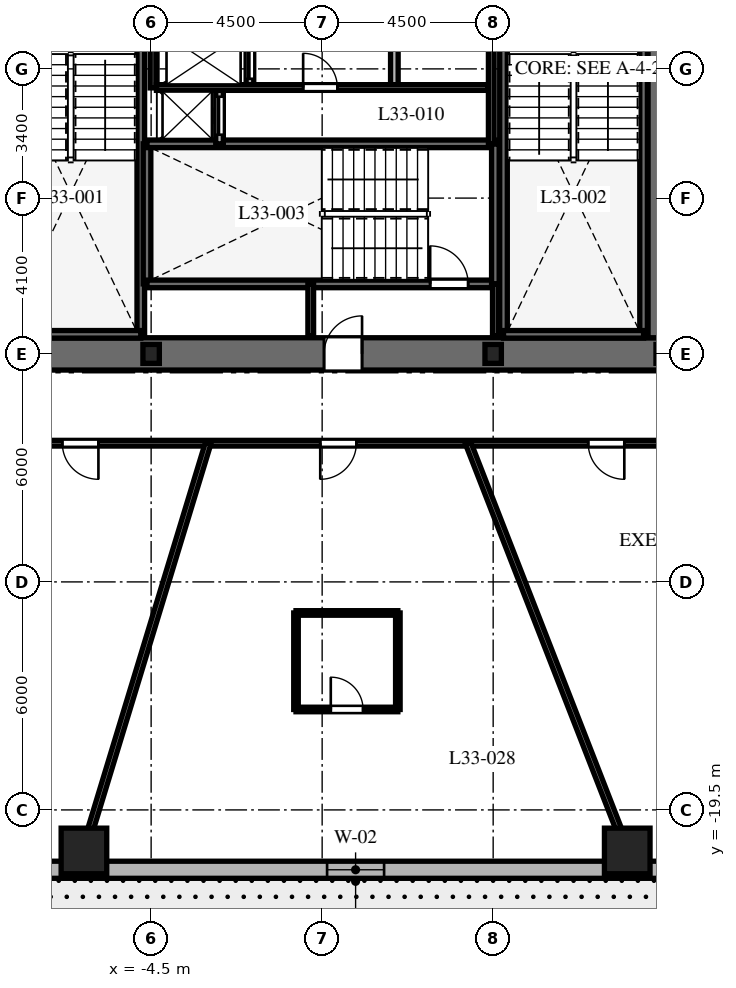
"""IFC4 building model, lengths in metres.
Left out: names, types, materials, properties, quantities, classifications, styles, units other than length and angle.
Written with IfcOpenShell. Run it as: python <this file> out.ifc"""

import sys

from ifc_helpers import new_model, si_unit, direction, frame, frame_2d, origin, origin_2d, place, context, subcontext, project, spatial, rectangle, i_section, extrude, element, fill, save


model = new_model("IFC4")
c1 = context("Model", 3, precision=1e-05, world=origin(), true_north=direction((0.0, 1.0)))
c2 = subcontext(c1, "Body", "Model", "MODEL_VIEW")
j1 = project(units=[si_unit("LENGTHUNIT", "METRE"), si_unit("PLANEANGLEUNIT", "RADIAN")], contexts=[c1])
p1 = place(None, origin())
s1 = spatial("IfcSite", under=j1, at=p1, CompositionType="ELEMENT")
p2 = place(p1, origin())
s2 = spatial("IfcBuilding", under=s1, at=p2, CompositionType="ELEMENT")
p3 = place(p2, frame((0.0, 0.0, 135.8)))
s3 = spatial("IfcBuildingStorey", under=s2, at=p3, CompositionType="ELEMENT", Elevation=135.8)
p4 = place(p3, frame((-9.425, -7.5, 0.0), z_axis=(0.0, 0.0, 1.0), x_axis=(1.0, 0.0, 0.0)))
e1 = element("IfcWall", 1, at=p4, inside=s3, PredefinedType="SHEAR", context=c2, shape_type="SweptSolid", body=[
    extrude(rectangle(XDim=18.85, YDim=0.85, at=frame_2d((9.425, 0.0))), origin(), (0.0, 0.0, 1.0), 3.7),
])
p5 = place(p4, frame((9.475, 0.0, 0.0)))
e2 = element("IfcOpeningElement", 2, at=p5, cuts=e1, PredefinedType="OPENING", context=c2, shape_type="SweptSolid", body=[
    extrude(rectangle(XDim=1.0, YDim=2.15, at=frame_2d((0.5, 1.075))), frame((0.0, 0.435, 0.0), z_axis=(0.0, -1.0, 0.0), x_axis=(1.0, 0.0, 0.0)), (0.0, 0.0, 1.0), 0.87),
])
p6 = place(p3, frame((9.0, -7.075, 0.0), z_axis=(0.0, 0.0, 1.0), x_axis=(0.0, 1.0, 0.0)))
e3 = element("IfcWall", 3, at=p6, inside=s3, PredefinedType="SHEAR", context=c2, shape_type="SweptSolid", body=[
    extrude(rectangle(XDim=14.15, YDim=0.85, at=frame_2d((7.075, 0.0))), origin(), (0.0, 0.0, 1.0), 3.7),
])
p7 = place(p6, frame((10.2, 0.0, 0.0)))
e4 = element("IfcOpeningElement", 4, at=p7, cuts=e3, PredefinedType="OPENING", context=c2, shape_type="SweptSolid", body=[
    extrude(rectangle(XDim=1.05, YDim=2.15, at=frame_2d((0.525, 1.075))), frame((0.0, 0.435, 0.0), z_axis=(0.0, -1.0, 0.0), x_axis=(1.0, 0.0, 0.0)), (0.0, 0.0, 1.0), 0.87),
])
p8 = place(p3, frame((-4.772, -6.985, 0.0), z_axis=(0.0, 0.0, 1.0), x_axis=(0.0, 1.0, 0.0)))
e5 = element("IfcWall", 5, at=p8, inside=s3, PredefinedType="SHEAR", context=c2, shape_type="SweptSolid", body=[
    extrude(rectangle(XDim=9.143, YDim=0.2, at=frame_2d((4.572, 0.0))), origin(), (0.0, 0.0, 1.0), 3.7),
])
p9 = place(p3, frame((-8.458, -6.985, 0.0), z_axis=(0.0, 0.0, 1.0), x_axis=(1.0, 0.0, 0.0)))
e6 = element("IfcWall", 6, at=p9, inside=s3, PredefinedType="SHEAR", context=c2, shape_type="SweptSolid", body=[
    extrude(rectangle(XDim=3.686, YDim=0.2, at=frame_2d((1.843, 0.0))), origin(), (0.0, 0.0, 1.0), 3.7),
])
for number, where, z_axis, x_axis in (
    (7, (4.772, -6.985, 0.0), (0.0, 0.0, 1.0), (0.0, 1.0, 0.0)),
    (8, (8.458, -6.985, 0.0), (0.0, 0.0, 1.0), (0.0, 1.0, 0.0)),
):
    element("IfcWall", number, at=place(p3, frame(where, z_axis=z_axis, x_axis=x_axis)), inside=s3, PredefinedType="SHEAR", context=c2, shape_type="SweptSolid", body=[
        extrude(rectangle(XDim=9.143, YDim=0.2, at=frame_2d((4.572, 0.0))), origin(), (0.0, 0.0, 1.0), 3.7),
    ])
for number, where, z_axis, x_axis in (
    (9, (4.772, -6.985, 0.0), (0.0, 0.0, 1.0), (1.0, 0.0, 0.0)),
    (10, (-4.608, -5.658, 0.0), (0.0, 0.0, 1.0), (0.0, 1.0, 0.0)),
):
    element("IfcWall", number, at=place(p3, frame(where, z_axis=z_axis, x_axis=x_axis)), inside=s3, PredefinedType="SHEAR", context=c2, shape_type="SweptSolid", body=[
        extrude(rectangle(XDim=3.686, YDim=0.2, at=frame_2d((1.843, 0.0))), origin(), (0.0, 0.0, 1.0), 3.7),
    ])
p10 = place(p3, frame((-4.608, -5.658, 0.0), z_axis=(0.0, 0.0, 1.0), x_axis=(1.0, 0.0, 0.0)))
e11 = element("IfcWall", 11, at=p10, inside=s3, PredefinedType="SHEAR", context=c2, shape_type="SweptSolid", body=[
    extrude(rectangle(XDim=9.166, YDim=0.2, at=frame_2d((4.583, 0.0))), origin(), (0.0, 0.0, 1.0), 3.7),
])
p11 = place(p10, frame((7.45, 0.0, 0.0)))
e12 = element("IfcOpeningElement", 12, at=p11, cuts=e11, PredefinedType="OPENING", context=c2, shape_type="SweptSolid", body=[
    extrude(rectangle(XDim=1.0, YDim=2.15, at=frame_2d((0.5, 1.075))), frame((0.0, 0.11, 0.0), z_axis=(0.0, -1.0, 0.0), x_axis=(1.0, 0.0, 0.0)), (0.0, 0.0, 1.0), 0.22),
])
p12 = place(p3, frame((-4.608, -1.972, 0.0), z_axis=(0.0, 0.0, 1.0), x_axis=(1.0, 0.0, 0.0)))
e13 = element("IfcWall", 13, at=p12, inside=s3, PredefinedType="SHEAR", context=c2, shape_type="SweptSolid", body=[
    extrude(rectangle(XDim=9.166, YDim=0.2, at=frame_2d((4.583, 0.0))), origin(), (0.0, 0.0, 1.0), 3.7),
])
p13 = place(p3, frame((4.558, -5.658, 0.0), z_axis=(0.0, 0.0, 1.0), x_axis=(0.0, 1.0, 0.0)))
e14 = element("IfcWall", 14, at=p13, inside=s3, PredefinedType="SHEAR", context=c2, shape_type="SweptSolid", body=[
    extrude(rectangle(XDim=3.686, YDim=0.2, at=frame_2d((1.843, 0.0))), origin(), (0.0, 0.0, 1.0), 3.7),
])
for number, where, z_axis, x_axis in (
    (15, (-4.5, -7.5, 0.0), (0.0, 0.0, 1.0), (1.0, 0.0, 0.0)),
    (16, (4.5, -7.5, 0.0), (0.0, 0.0, 1.0), (1.0, 0.0, 0.0)),
    (17, (9.0, -7.5, 0.0), (0.0, 0.0, 1.0), (1.0, 0.0, 0.0)),
):
    element("IfcColumn", number, at=place(p3, frame(where, z_axis=z_axis, x_axis=x_axis)), inside=s3, PredefinedType="COLUMN", context=c2, shape_type="SweptSolid", body=[
        extrude(i_section(OverallWidth=0.432, OverallDepth=0.498, WebThickness=0.056, FlangeThickness=0.089, at=origin_2d()), origin(), (0.0, 0.0, 1.0), 3.7),
    ])
for number, where, z_axis, x_axis in (
    (18, (-6.268, -20.58, 0.0), (0.0, 0.0, 1.0), (1.0, 0.0, 0.0)),
    (19, (8.028, -20.58, 0.0), (0.0, 0.0, 1.0), (1.0, 0.0, 0.0)),
):
    element("IfcColumn", number, at=place(p3, frame(where, z_axis=z_axis, x_axis=x_axis)), inside=s3, PredefinedType="COLUMN", context=c2, shape_type="SweptSolid", body=[
        extrude(rectangle(XDim=1.2, YDim=1.2, at=origin_2d()), origin(), (0.0, 0.0, 1.0), 3.7),
    ])
p14 = place(p3, frame((-11.012, -21.075, 0.0), z_axis=(0.0, 0.0, 1.0), x_axis=(1.0, 0.0, 0.0)))
e20 = element("IfcWall", 20, at=p14, inside=s3, PredefinedType="SOLIDWALL", context=c2, shape_type="SweptSolid", body=[
    extrude(rectangle(XDim=23.782, YDim=0.45, at=frame_2d((11.891, 0.0))), origin(), (0.0, 0.0, 1.0), 3.38),
])
p15 = place(p14, frame((2.473, 0.0, 0.0)))
e21 = element("IfcOpeningElement", 21, at=p15, cuts=e20, PredefinedType="OPENING", context=c2, shape_type="SweptSolid", body=[
    extrude(rectangle(XDim=1.0, YDim=2.15, at=frame_2d((0.5, 1.075))), frame((0.0, 0.235, 0.0), z_axis=(0.0, -1.0, 0.0), x_axis=(1.0, 0.0, 0.0)), (0.0, 0.0, 1.0), 0.47),
])
p16 = place(p14, frame((11.142, 0.0, 0.8)))
e22 = element("IfcOpeningElement", 22, at=p16, cuts=e20, PredefinedType="OPENING", context=c2, shape_type="SweptSolid", body=[
    extrude(rectangle(XDim=1.5, YDim=1.8, at=frame_2d((0.75, 0.9))), frame((0.0, 0.235, 0.0), z_axis=(0.0, -1.0, 0.0), x_axis=(1.0, 0.0, 0.0)), (0.0, 0.0, 1.0), 0.47),
])
p17 = place(p14, frame((20.741, 0.0, 0.8)))
e23 = element("IfcOpeningElement", 23, at=p17, cuts=e20, PredefinedType="OPENING", context=c2, shape_type="SweptSolid", body=[
    extrude(rectangle(XDim=1.5, YDim=1.8, at=frame_2d((0.75, 0.9))), frame((0.0, 0.235, 0.0), z_axis=(0.0, -1.0, 0.0), x_axis=(1.0, 0.0, 0.0)), (0.0, 0.0, 1.0), 0.47),
])
for number, where, z_axis, x_axis in (
    (24, (-0.3, -7.02, 0.0), (0.0, 0.0, 1.0), (0.0, 1.0, 0.0)),
    (25, (4.558, -7.02, 0.0), (0.0, 0.0, 1.0), (0.0, 1.0, 0.0)),
):
    element("IfcWall", number, at=place(p3, frame(where, z_axis=z_axis, x_axis=x_axis)), inside=s3, PredefinedType="PARTITIONING", context=c2, shape_type="SweptSolid", body=[
        extrude(rectangle(XDim=1.362, YDim=0.15, at=frame_2d((0.681, 0.0))), origin(), (0.0, 0.0, 1.0), 3.38),
    ])
p18 = place(p3, frame((-2.7, -1.972, 0.0), z_axis=(0.0, 0.0, 1.0), x_axis=(0.0, 1.0, 0.0)))
e26 = element("IfcWall", 26, at=p18, inside=s3, PredefinedType="PARTITIONING", context=c2, shape_type="SweptSolid", body=[
    extrude(rectangle(XDim=1.472, YDim=0.2, at=frame_2d((0.736, 0.0))), origin(), (0.0, 0.0, 1.0), 3.38),
])
p19 = place(p18, frame((0.24, 0.0, 0.0)))
e27 = element("IfcOpeningElement", 27, at=p19, cuts=e26, PredefinedType="OPENING", context=c2, shape_type="SweptSolid", body=[
    extrude(rectangle(XDim=1.0, YDim=2.2, at=frame_2d((0.5, 1.1))), frame((0.0, 0.11, 0.0), z_axis=(0.0, -1.0, 0.0), x_axis=(1.0, 0.0, 0.0)), (0.0, 0.0, 1.0), 0.22),
])
p20 = place(p3, frame((-4.45, -0.5, 0.0), z_axis=(0.0, 0.0, 1.0), x_axis=(0.0, 1.0, 0.0)))
e28 = element("IfcWall", 28, at=p20, inside=s3, PredefinedType="PARTITIONING", context=c2, shape_type="SweptSolid", body=[
    extrude(rectangle(XDim=2.75, YDim=0.15, at=frame_2d((1.375, 0.0))), origin(), (0.0, 0.0, 1.0), 3.38),
])
p21 = place(p3, frame((4.45, -1.972, 0.0), z_axis=(0.0, 0.0, 1.0), x_axis=(0.0, 1.0, 0.0)))
e29 = element("IfcWall", 29, at=p21, inside=s3, PredefinedType="PARTITIONING", context=c2, shape_type="SweptSolid", body=[
    extrude(rectangle(XDim=4.222, YDim=0.15, at=frame_2d((2.111, 0.0))), origin(), (0.0, 0.0, 1.0), 3.38),
])
p22 = place(p3, frame((-1.9, -0.5, 0.0), z_axis=(0.0, 0.0, 1.0), x_axis=(0.0, 1.0, 0.0)))
e30 = element("IfcWall", 30, at=p22, inside=s3, PredefinedType="PARTITIONING", context=c2, shape_type="SweptSolid", body=[
    extrude(rectangle(XDim=4.44, YDim=0.2, at=frame_2d((2.22, 0.0))), origin(), (0.0, 0.0, 1.0), 3.38),
])
p23 = place(p22, frame((0.24, 0.0, 0.0)))
e31 = element("IfcOpeningElement", 31, at=p23, cuts=e30, PredefinedType="OPENING", context=c2, shape_type="SweptSolid", body=[
    extrude(rectangle(XDim=1.0, YDim=2.2, at=frame_2d((0.5, 1.1))), frame((0.0, 0.11, 0.0), z_axis=(0.0, -1.0, 0.0), x_axis=(1.0, 0.0, 0.0)), (0.0, 0.0, 1.0), 0.22),
])
p24 = place(p22, frame((1.72, 0.0, 0.0)))
e32 = element("IfcOpeningElement", 32, at=p24, cuts=e30, PredefinedType="OPENING", context=c2, shape_type="SweptSolid", body=[
    extrude(rectangle(XDim=1.0, YDim=2.2, at=frame_2d((0.5, 1.1))), frame((0.0, 0.11, 0.0), z_axis=(0.0, -1.0, 0.0), x_axis=(1.0, 0.0, 0.0)), (0.0, 0.0, 1.0), 0.22),
])
p25 = place(p22, frame((3.2, 0.0, 0.0)))
e33 = element("IfcOpeningElement", 33, at=p25, cuts=e30, PredefinedType="OPENING", context=c2, shape_type="SweptSolid", body=[
    extrude(rectangle(XDim=1.0, YDim=2.2, at=frame_2d((0.5, 1.1))), frame((0.0, 0.11, 0.0), z_axis=(0.0, -1.0, 0.0), x_axis=(1.0, 0.0, 0.0)), (0.0, 0.0, 1.0), 0.22),
])
p26 = place(p3, frame((1.9, -0.5, 0.0), z_axis=(0.0, 0.0, 1.0), x_axis=(0.0, 1.0, 0.0)))
e34 = element("IfcWall", 34, at=p26, inside=s3, PredefinedType="PARTITIONING", context=c2, shape_type="SweptSolid", body=[
    extrude(rectangle(XDim=4.44, YDim=0.2, at=frame_2d((2.22, 0.0))), origin(), (0.0, 0.0, 1.0), 3.38),
])
p27 = place(p3, frame((-4.36, -0.49, 0.0), z_axis=(0.0, 0.0, 1.0), x_axis=(1.0, 0.0, 0.0)))
e35 = element("IfcWall", 35, at=p27, inside=s3, PredefinedType="PARTITIONING", context=c2, shape_type="SweptSolid", body=[
    extrude(rectangle(XDim=8.72, YDim=0.15, at=frame_2d((4.36, 0.0))), origin(), (0.0, 0.0, 1.0), 3.38),
])
p28 = place(p27, frame((3.86, 0.0, 0.0)))
e36 = element("IfcOpeningElement", 36, at=p28, cuts=e35, PredefinedType="OPENING", context=c2, shape_type="SweptSolid", body=[
    extrude(rectangle(XDim=0.9, YDim=2.03, at=frame_2d((0.45, 1.015))), frame((0.0, 0.085, 0.0), z_axis=(0.0, -1.0, 0.0), x_axis=(1.0, 0.0, 0.0)), (0.0, 0.0, 1.0), 0.17),
])
p29 = place(p3, frame((11.35, -9.85, 0.0), z_axis=(0.0, 0.0, 1.0), x_axis=(-1.0, 0.0, 0.0)))
e37 = element("IfcWall", 37, at=p29, inside=s3, PredefinedType="PARTITIONING", context=c2, shape_type="SweptSolid", body=[
    extrude(rectangle(XDim=22.7, YDim=0.15, at=frame_2d((11.35, 0.0))), origin(), (0.0, 0.0, 1.0), 2.82),
])
p30 = place(p29, frame((17.237, 0.0, 0.0)))
e38 = element("IfcOpeningElement", 38, at=p30, cuts=e37, PredefinedType="OPENING", context=c2, shape_type="SweptSolid", body=[
    extrude(rectangle(XDim=0.95, YDim=2.03, at=frame_2d((0.475, 1.015))), frame((0.0, 0.085, 0.0), z_axis=(0.0, -1.0, 0.0), x_axis=(1.0, 0.0, 0.0)), (0.0, 0.0, 1.0), 0.17),
])
p31 = place(p29, frame((10.45, 0.0, 0.0)))
e39 = element("IfcOpeningElement", 39, at=p31, cuts=e37, PredefinedType="OPENING", context=c2, shape_type="SweptSolid", body=[
    extrude(rectangle(XDim=0.95, YDim=2.03, at=frame_2d((0.475, 1.015))), frame((0.0, 0.085, 0.0), z_axis=(0.0, -1.0, 0.0), x_axis=(1.0, 0.0, 0.0)), (0.0, 0.0, 1.0), 0.17),
])
p32 = place(p29, frame((3.399, 0.0, 0.0)))
e40 = element("IfcOpeningElement", 40, at=p32, cuts=e37, PredefinedType="OPENING", context=c2, shape_type="SweptSolid", body=[
    extrude(rectangle(XDim=0.95, YDim=2.03, at=frame_2d((0.475, 1.015))), frame((0.0, 0.085, 0.0), z_axis=(0.0, -1.0, 0.0), x_axis=(1.0, 0.0, 0.0)), (0.0, 0.0, 1.0), 0.17),
])
p33 = place(p3, frame((-3.0, -9.85, 0.0), z_axis=(0.0, 0.0, 1.0), x_axis=(-0.291352035382, -0.95661590593, 0.0)))
e41 = element("IfcWall", 41, at=p33, inside=s3, PredefinedType="PARTITIONING", context=c2, shape_type="SweptSolid", body=[
    extrude(rectangle(XDim=11.734, YDim=0.15, at=frame_2d((5.867, 0.0))), origin(), (0.0, 0.0, 1.0), 2.52),
])
p34 = place(p3, frame((3.842, -9.85, 0.0), z_axis=(0.0, 0.0, 1.0), x_axis=(0.363432685593, -0.931620460833, 0.0)))
e42 = element("IfcWall", 42, at=p34, inside=s3, PredefinedType="PARTITIONING", context=c2, shape_type="SweptSolid", body=[
    extrude(rectangle(XDim=12.049, YDim=0.15, at=frame_2d((6.024, 0.0))), origin(), (0.0, 0.0, 1.0), 2.52),
])
p35 = place(p3, frame((-0.688, -16.857, 0.0), z_axis=(0.0, 0.0, 1.0), x_axis=(1.0, 0.0, 0.0)))
e43 = element("IfcWall", 43, at=p35, inside=s3, PredefinedType="PARTITIONING", context=c2, shape_type="SweptSolid", body=[
    extrude(rectangle(XDim=2.68, YDim=0.12, at=frame_2d((1.34, 0.0))), origin(), (0.0, 0.0, 1.0), 3.38),
])
p36 = place(p35, frame((0.915, 0.0, 0.0)))
e44 = element("IfcOpeningElement", 44, at=p36, cuts=e43, PredefinedType="OPENING", context=c2, shape_type="SweptSolid", body=[
    extrude(rectangle(XDim=0.85, YDim=2.03, at=frame_2d((0.425, 1.015))), frame((0.0, 0.07, 0.0), z_axis=(0.0, -1.0, 0.0), x_axis=(1.0, 0.0, 0.0)), (0.0, 0.0, 1.0), 0.14),
])
p37 = place(p3, frame((1.992, -16.857, 0.0), z_axis=(0.0, 0.0, 1.0), x_axis=(0.0, 1.0, 0.0)))
e45 = element("IfcWall", 45, at=p37, inside=s3, PredefinedType="PARTITIONING", context=c2, shape_type="SweptSolid", body=[
    extrude(rectangle(XDim=2.54, YDim=0.12, at=frame_2d((1.27, 0.0))), origin(), (0.0, 0.0, 1.0), 2.821),
])
p38 = place(p3, frame((1.992, -14.317, 0.0), z_axis=(0.0, 0.0, 1.0), x_axis=(-1.0, 0.0, 0.0)))
e46 = element("IfcWall", 46, at=p38, inside=s3, PredefinedType="PARTITIONING", context=c2, shape_type="SweptSolid", body=[
    extrude(rectangle(XDim=2.68, YDim=0.12, at=frame_2d((1.34, 0.0))), origin(), (0.0, 0.0, 1.0), 3.38),
])
p39 = place(p3, frame((-0.688, -14.317, 0.0), z_axis=(0.0, 0.0, 1.0), x_axis=(0.0, -1.0, 0.0)))
e47 = element("IfcWall", 47, at=p39, inside=s3, PredefinedType="PARTITIONING", context=c2, shape_type="SweptSolid", body=[
    extrude(rectangle(XDim=2.54, YDim=0.12, at=frame_2d((1.27, 0.0))), origin(), (0.0, 0.0, 1.0), 2.821),
])
p40 = place(p16, origin())
e48 = element("IfcWindow", 48, at=p40, inside=s3, PartitioningType="SINGLE_PANEL", PredefinedType="WINDOW", context=c2, shape_type="SweptSolid", body=[
    extrude(rectangle(XDim=1.5, YDim=1.8, at=frame_2d((0.75, 0.9))), frame((0.0, 0.03, 0.0), z_axis=(0.0, -1.0, 0.0), x_axis=(1.0, 0.0, 0.0)), (0.0, 0.0, 1.0), 0.06),
])
fill(e22, e48)
p41 = place(p11, origin())
e49 = element("IfcDoor", 49, at=p41, inside=s3, OperationType="SINGLE_SWING_LEFT", PredefinedType="DOOR", context=c2, shape_type="SweptSolid", body=[
    extrude(rectangle(XDim=1.0, YDim=2.15, at=frame_2d((0.5, 1.075))), frame((0.0, 0.025, 0.0), z_axis=(0.0, -1.0, 0.0), x_axis=(1.0, 0.0, 0.0)), (0.0, 0.0, 1.0), 0.05),
])
fill(e12, e49)
p42 = place(p5, origin())
e50 = element("IfcDoor", 50, at=p42, inside=s3, OperationType="SINGLE_SWING_RIGHT", PredefinedType="DOOR", context=c2, shape_type="SweptSolid", body=[
    extrude(rectangle(XDim=1.0, YDim=2.15, at=frame_2d((0.5, 1.075))), frame((0.0, 0.025, 0.0), z_axis=(0.0, -1.0, 0.0), x_axis=(1.0, 0.0, 0.0)), (0.0, 0.0, 1.0), 0.05),
])
fill(e2, e50)
p43 = place(p19, origin())
e51 = element("IfcDoor", 51, at=p43, inside=s3, OperationType="SLIDING_TO_LEFT", PredefinedType="DOOR", context=c2, shape_type="SweptSolid", body=[
    extrude(rectangle(XDim=1.0, YDim=2.2, at=frame_2d((0.5, 1.1))), frame((0.0, 0.025, 0.0), z_axis=(0.0, -1.0, 0.0), x_axis=(1.0, 0.0, 0.0)), (0.0, 0.0, 1.0), 0.05),
])
fill(e27, e51)
p44 = place(p23, origin())
e52 = element("IfcDoor", 52, at=p44, inside=s3, OperationType="SLIDING_TO_LEFT", PredefinedType="DOOR", context=c2, shape_type="SweptSolid", body=[
    extrude(rectangle(XDim=1.0, YDim=2.2, at=frame_2d((0.5, 1.1))), frame((0.0, 0.025, 0.0), z_axis=(0.0, -1.0, 0.0), x_axis=(1.0, 0.0, 0.0)), (0.0, 0.0, 1.0), 0.05),
])
fill(e31, e52)
p45 = place(p28, origin())
e53 = element("IfcDoor", 53, at=p45, inside=s3, OperationType="SINGLE_SWING_LEFT", PredefinedType="DOOR", context=c2, shape_type="SweptSolid", body=[
    extrude(rectangle(XDim=0.9, YDim=2.03, at=frame_2d((0.45, 1.015))), frame((0.0, 0.025, 0.0), z_axis=(0.0, -1.0, 0.0), x_axis=(1.0, 0.0, 0.0)), (0.0, 0.0, 1.0), 0.05),
])
fill(e36, e53)
p46 = place(p30, origin())
e54 = element("IfcDoor", 54, at=p46, inside=s3, OperationType="SINGLE_SWING_LEFT", PredefinedType="DOOR", context=c2, shape_type="SweptSolid", body=[
    extrude(rectangle(XDim=0.95, YDim=2.03, at=frame_2d((0.475, 1.015))), frame((0.0, 0.025, 0.0), z_axis=(0.0, -1.0, 0.0), x_axis=(1.0, 0.0, 0.0)), (0.0, 0.0, 1.0), 0.05),
])
fill(e38, e54)
p47 = place(p31, origin())
e55 = element("IfcDoor", 55, at=p47, inside=s3, OperationType="SINGLE_SWING_RIGHT", PredefinedType="DOOR", context=c2, shape_type="SweptSolid", body=[
    extrude(rectangle(XDim=0.95, YDim=2.03, at=frame_2d((0.475, 1.015))), frame((0.0, 0.025, 0.0), z_axis=(0.0, -1.0, 0.0), x_axis=(1.0, 0.0, 0.0)), (0.0, 0.0, 1.0), 0.05),
])
fill(e39, e55)
p48 = place(p36, origin())
e56 = element("IfcDoor", 56, at=p48, inside=s3, OperationType="SINGLE_SWING_LEFT", PredefinedType="DOOR", context=c2, shape_type="SweptSolid", body=[
    extrude(rectangle(XDim=0.85, YDim=2.03, at=frame_2d((0.425, 1.015))), frame((0.0, 0.025, 0.0), z_axis=(0.0, -1.0, 0.0), x_axis=(1.0, 0.0, 0.0)), (0.0, 0.0, 1.0), 0.05),
])
fill(e44, e56)
p49 = place(p32, origin())
e57 = element("IfcDoor", 57, at=p49, inside=s3, OperationType="SINGLE_SWING_LEFT", PredefinedType="DOOR", context=c2, shape_type="SweptSolid", body=[
    extrude(rectangle(XDim=0.95, YDim=2.03, at=frame_2d((0.475, 1.015))), frame((0.0, 0.025, 0.0), z_axis=(0.0, -1.0, 0.0), x_axis=(1.0, 0.0, 0.0)), (0.0, 0.0, 1.0), 0.05),
])
fill(e40, e57)
save(model, sys.argv[1])
